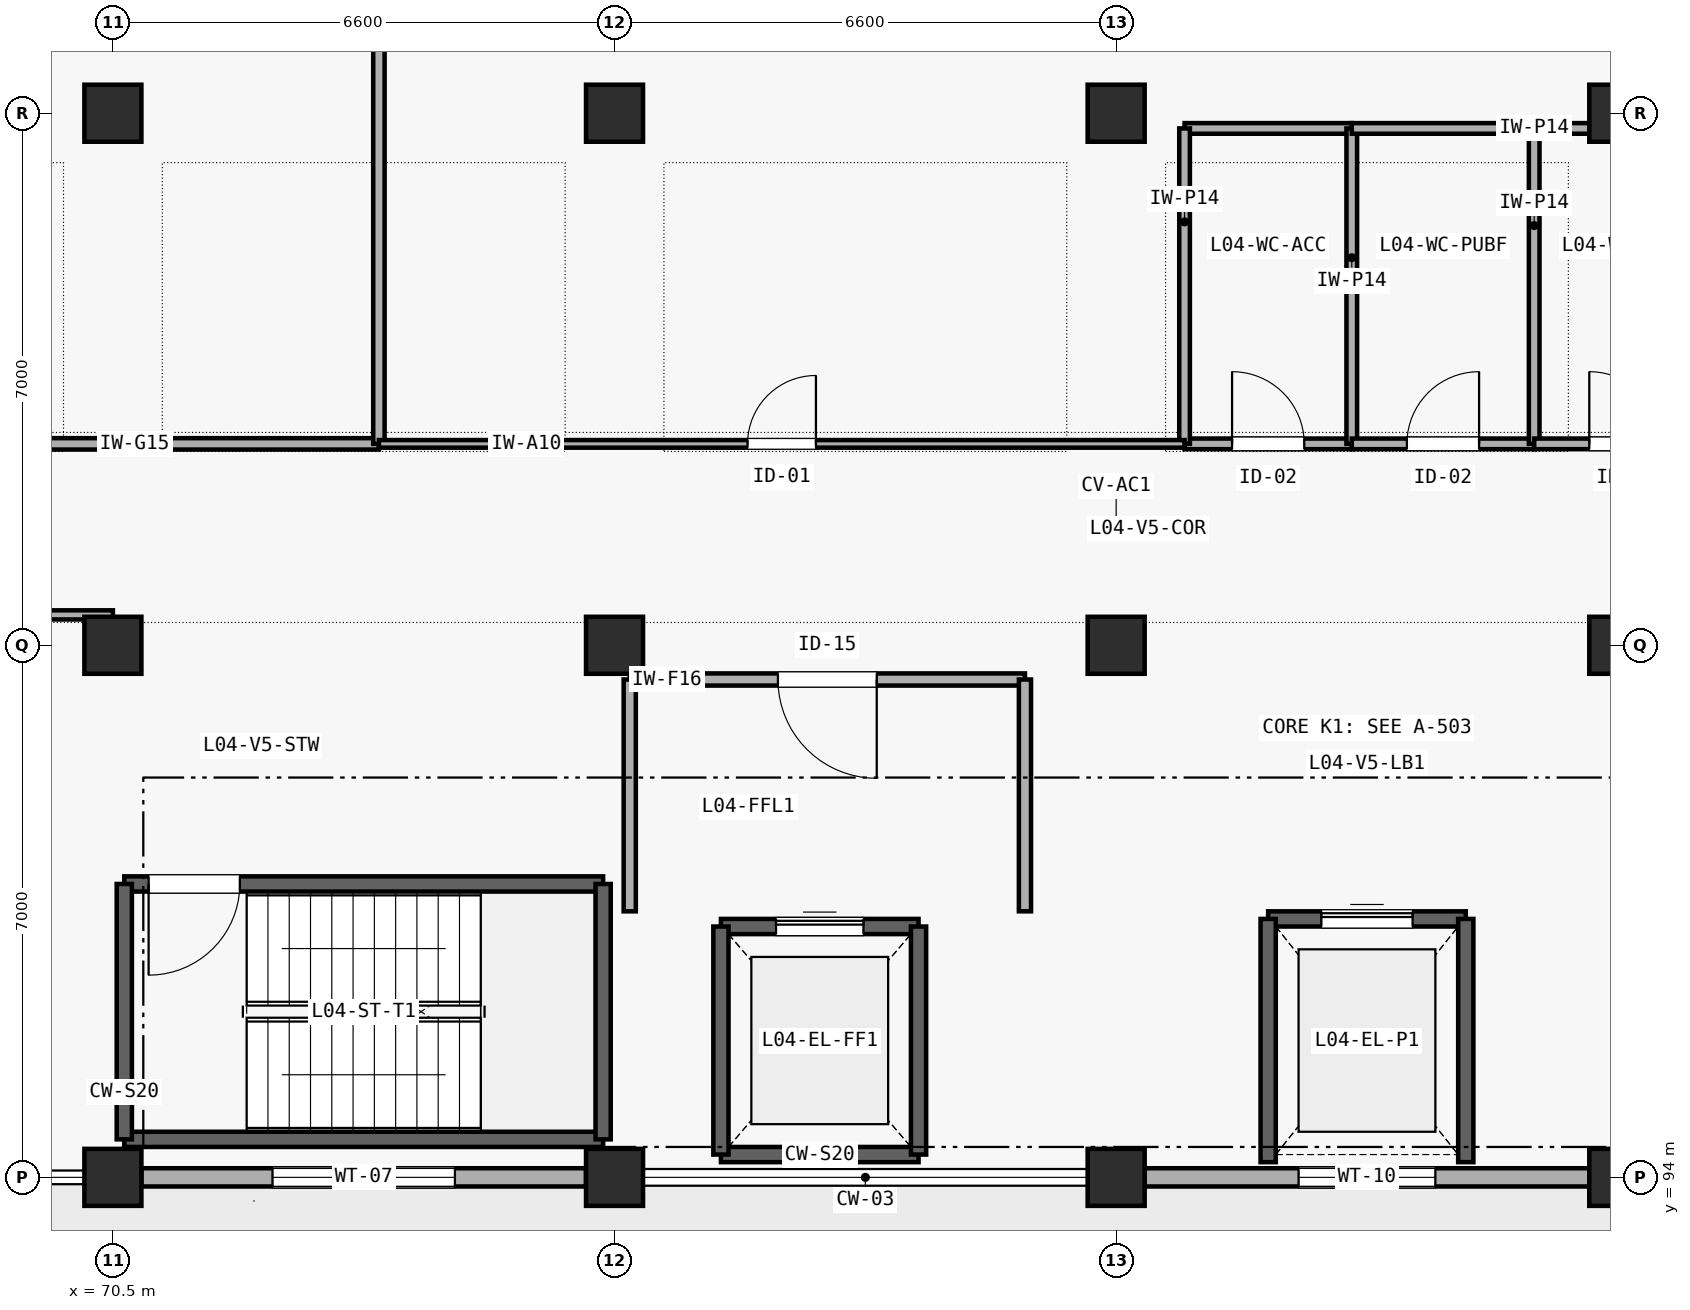
"""IFC4 building model, lengths in metres.
Left out: names, types, materials, properties, quantities, classifications, styles, units other than length and angle.
Written with IfcOpenShell. Run it as: python <this file> out.ifc"""

import sys

from ifc_helpers import new_model, si_unit, direction, frame, frame_2d, origin, origin_2d, place, context, subcontext, project, spatial, rectangle, extrude, element, fill, save


model = new_model("IFC4")
c1 = context("Model", 3, precision=1e-05, world=origin(), true_north=direction((0.0, 1.0)))
c2 = subcontext(c1, "Body", "Model", "MODEL_VIEW")
j1 = project(units=[si_unit("LENGTHUNIT", "METRE"), si_unit("PLANEANGLEUNIT", "RADIAN")], contexts=[c1])
p1 = place(None, origin())
s1 = spatial("IfcSite", under=j1, at=p1, CompositionType="ELEMENT")
p2 = place(p1, origin())
s2 = spatial("IfcBuilding", under=s1, at=p2, CompositionType="ELEMENT")
p3 = place(p2, frame((0.0, 0.0, 16.8)))
s3 = spatial("IfcBuildingStorey", under=s2, at=p3, CompositionType="ELEMENT", Elevation=16.8)
for number, where, z_axis, x_axis in (
    (1, (70.5, 94.0, 0.0), (0.0, 0.0, 1.0), (1.0, 0.0, 0.0)),
    (2, (70.5, 101.0, 0.0), (0.0, 0.0, 1.0), (1.0, 0.0, 0.0)),
    (3, (70.5, 108.0, 0.0), (0.0, 0.0, 1.0), (1.0, 0.0, 0.0)),
    (4, (77.1, 94.0, 0.0), (0.0, 0.0, 1.0), (1.0, 0.0, 0.0)),
    (5, (77.1, 101.0, 0.0), (0.0, 0.0, 1.0), (1.0, 0.0, 0.0)),
    (6, (77.1, 108.0, 0.0), (0.0, 0.0, 1.0), (1.0, 0.0, 0.0)),
    (7, (83.7, 94.0, 0.0), (0.0, 0.0, 1.0), (1.0, 0.0, 0.0)),
    (8, (83.7, 101.0, 0.0), (0.0, 0.0, 1.0), (1.0, 0.0, 0.0)),
    (9, (83.7, 108.0, 0.0), (0.0, 0.0, 1.0), (1.0, 0.0, 0.0)),
    (10, (90.3, 94.0, 0.0), (0.0, 0.0, 1.0), (1.0, 0.0, 0.0)),
    (11, (90.3, 101.0, 0.0), (0.0, 0.0, 1.0), (1.0, 0.0, 0.0)),
    (12, (90.3, 108.0, 0.0), (0.0, 0.0, 1.0), (1.0, 0.0, 0.0)),
):
    element("IfcColumn", number, at=place(p3, frame(where, z_axis=z_axis, x_axis=x_axis)), inside=s3, PredefinedType="COLUMN", context=c2, shape_type="SweptSolid", body=[
        extrude(rectangle(XDim=0.75, YDim=0.75, at=origin_2d()), origin(), (0.0, 0.0, 1.0), 4.2),
    ])
p4 = place(p3, frame((70.875, 94.0, 0.0), z_axis=(0.0, 0.0, 1.0), x_axis=(1.0, 0.0, 0.0)))
e13 = element("IfcWall", 13, at=p4, inside=s3, PredefinedType="SOLIDWALL", context=c2, shape_type="SweptSolid", body=[
    extrude(rectangle(XDim=5.85, YDim=0.24, at=frame_2d((2.925, 0.0))), origin(), (0.0, 0.0, 1.0), 3.365),
])
p5 = place(p4, frame((1.725, 0.0, 0.85)))
e14 = element("IfcOpeningElement", 14, at=p5, cuts=e13, PredefinedType="OPENING", context=c2, shape_type="SweptSolid", body=[
    extrude(rectangle(XDim=2.4, YDim=1.35, at=frame_2d((1.2, 0.675))), frame((0.0, 0.13, 0.0), z_axis=(0.0, -1.0, 0.0), x_axis=(1.0, 0.0, 0.0)), (0.0, 0.0, 1.0), 0.26),
])
p6 = place(p3, frame((84.075, 94.0, 0.0), z_axis=(0.0, 0.0, 1.0), x_axis=(1.0, 0.0, 0.0)))
e15 = element("IfcWall", 15, at=p6, inside=s3, PredefinedType="SOLIDWALL", context=c2, shape_type="SweptSolid", body=[
    extrude(rectangle(XDim=5.85, YDim=0.24, at=frame_2d((2.925, 0.0))), origin(), (0.0, 0.0, 1.0), 3.345),
])
p7 = place(p6, frame((2.025, 0.0, 0.85)))
e16 = element("IfcOpeningElement", 16, at=p7, cuts=e15, PredefinedType="OPENING", context=c2, shape_type="SweptSolid", body=[
    extrude(rectangle(XDim=1.8, YDim=1.5, at=frame_2d((0.9, 0.75))), frame((0.0, 0.13, 0.0), z_axis=(0.0, -1.0, 0.0), x_axis=(1.0, 0.0, 0.0)), (0.0, 0.0, 1.0), 0.26),
])
p8 = place(p3, frame((70.65, 94.5, 0.0), z_axis=(0.0, 0.0, 1.0), x_axis=(1.0, 0.0, 0.0)))
e17 = element("IfcWall", 17, at=p8, inside=s3, PredefinedType="SHEAR", context=c2, shape_type="SweptSolid", body=[
    extrude(rectangle(XDim=6.3, YDim=0.2, at=frame_2d((3.15, 0.0))), origin(), (0.0, 0.0, 1.0), 4.2),
])
p9 = place(p3, frame((70.65, 97.86, 0.0), z_axis=(0.0, 0.0, 1.0), x_axis=(1.0, 0.0, 0.0)))
e18 = element("IfcWall", 18, at=p9, inside=s3, PredefinedType="SHEAR", context=c2, shape_type="SweptSolid", body=[
    extrude(rectangle(XDim=6.3, YDim=0.2, at=frame_2d((3.15, 0.0))), origin(), (0.0, 0.0, 1.0), 4.2),
])
p10 = place(p9, frame((0.32, 0.0, 0.0)))
e19 = element("IfcOpeningElement", 19, at=p10, cuts=e18, PredefinedType="OPENING", context=c2, shape_type="SweptSolid", body=[
    extrude(rectangle(XDim=1.2, YDim=2.15, at=frame_2d((0.6, 1.075))), frame((0.0, 0.11, 0.0), z_axis=(0.0, -1.0, 0.0), x_axis=(1.0, 0.0, 0.0)), (0.0, 0.0, 1.0), 0.22),
])
for number, where, z_axis, x_axis in (
    (20, (70.65, 94.5, 0.0), (0.0, 0.0, 1.0), (0.0, 1.0, 0.0)),
    (21, (76.95, 94.5, 0.0), (0.0, 0.0, 1.0), (0.0, 1.0, 0.0)),
):
    element("IfcWall", number, at=place(p3, frame(where, z_axis=z_axis, x_axis=x_axis)), inside=s3, PredefinedType="SHEAR", context=c2, shape_type="SweptSolid", body=[
        extrude(rectangle(XDim=3.36, YDim=0.2, at=frame_2d((1.68, 0.0))), origin(), (0.0, 0.0, 1.0), 4.2),
    ])
p11 = place(p3, frame((78.5, 94.3, 0.0), z_axis=(0.0, 0.0, 1.0), x_axis=(1.0, 0.0, 0.0)))
e22 = element("IfcWall", 22, at=p11, inside=s3, PredefinedType="SHEAR", context=c2, shape_type="SweptSolid", body=[
    extrude(rectangle(XDim=2.6, YDim=0.2, at=frame_2d((1.3, 0.0))), origin(), (0.0, 0.0, 1.0), 4.2),
])
p12 = place(p3, frame((78.5, 97.3, 0.0), z_axis=(0.0, 0.0, 1.0), x_axis=(1.0, 0.0, 0.0)))
e23 = element("IfcWall", 23, at=p12, inside=s3, PredefinedType="SHEAR", context=c2, shape_type="SweptSolid", body=[
    extrude(rectangle(XDim=2.6, YDim=0.2, at=frame_2d((1.3, 0.0))), origin(), (0.0, 0.0, 1.0), 4.2),
])
p13 = place(p12, frame((0.725, 0.0, 0.0)))
e24 = element("IfcOpeningElement", 24, at=p13, cuts=e23, PredefinedType="OPENING", context=c2, shape_type="SweptSolid", body=[
    extrude(rectangle(XDim=1.15, YDim=2.2, at=frame_2d((0.575, 1.1))), frame((0.0, 0.11, 0.0), z_axis=(0.0, -1.0, 0.0), x_axis=(1.0, 0.0, 0.0)), (0.0, 0.0, 1.0), 0.22),
])
for number, where, z_axis, x_axis in (
    (25, (78.5, 94.3, 0.0), (0.0, 0.0, 1.0), (0.0, 1.0, 0.0)),
    (26, (81.1, 94.3, 0.0), (0.0, 0.0, 1.0), (0.0, 1.0, 0.0)),
):
    element("IfcWall", number, at=place(p3, frame(where, z_axis=z_axis, x_axis=x_axis)), inside=s3, PredefinedType="SHEAR", context=c2, shape_type="SweptSolid", body=[
        extrude(rectangle(XDim=3.0, YDim=0.2, at=frame_2d((1.5, 0.0))), origin(), (0.0, 0.0, 1.0), 4.2),
    ])
p14 = place(p3, frame((85.7, 97.4, 0.0), z_axis=(0.0, 0.0, 1.0), x_axis=(1.0, 0.0, 0.0)))
e27 = element("IfcWall", 27, at=p14, inside=s3, PredefinedType="SHEAR", context=c2, shape_type="SweptSolid", body=[
    extrude(rectangle(XDim=2.6, YDim=0.2, at=frame_2d((1.3, 0.0))), origin(), (0.0, 0.0, 1.0), 4.2),
])
p15 = place(p14, frame((0.7, 0.0, 0.0)))
e28 = element("IfcOpeningElement", 28, at=p15, cuts=e27, PredefinedType="OPENING", context=c2, shape_type="SweptSolid", body=[
    extrude(rectangle(XDim=1.2, YDim=2.2, at=frame_2d((0.6, 1.1))), frame((0.0, 0.11, 0.0), z_axis=(0.0, -1.0, 0.0), x_axis=(1.0, 0.0, 0.0)), (0.0, 0.0, 1.0), 0.22),
])
for number, where, z_axis, x_axis in (
    (29, (85.7, 94.2, 0.0), (0.0, 0.0, 1.0), (0.0, 1.0, 0.0)),
    (30, (88.3, 94.2, 0.0), (0.0, 0.0, 1.0), (0.0, 1.0, 0.0)),
):
    element("IfcWall", number, at=place(p3, frame(where, z_axis=z_axis, x_axis=x_axis)), inside=s3, PredefinedType="SHEAR", context=c2, shape_type="SweptSolid", body=[
        extrude(rectangle(XDim=3.2, YDim=0.2, at=frame_2d((1.6, 0.0))), origin(), (0.0, 0.0, 1.0), 4.2),
    ])
p16 = place(p3, frame((77.3, 100.55, 0.0), z_axis=(0.0, 0.0, 1.0), x_axis=(1.0, 0.0, 0.0)))
e31 = element("IfcWall", 31, at=p16, inside=s3, PredefinedType="SOLIDWALL", context=c2, shape_type="SweptSolid", body=[
    extrude(rectangle(XDim=5.2, YDim=0.16, at=frame_2d((2.6, 0.0))), origin(), (0.0, 0.0, 1.0), 3.9),
])
p17 = place(p16, frame((1.95, 0.0, 0.0)))
e32 = element("IfcOpeningElement", 32, at=p17, cuts=e31, PredefinedType="OPENING", context=c2, shape_type="SweptSolid", body=[
    extrude(rectangle(XDim=1.3, YDim=2.15, at=frame_2d((0.65, 1.075))), frame((0.0, 0.09, 0.0), z_axis=(0.0, -1.0, 0.0), x_axis=(1.0, 0.0, 0.0)), (0.0, 0.0, 1.0), 0.18),
])
p18 = place(p3, frame((77.3, 97.5, 0.0), z_axis=(0.0, 0.0, 1.0), x_axis=(0.0, 1.0, 0.0)))
e33 = element("IfcWall", 33, at=p18, inside=s3, PredefinedType="SOLIDWALL", context=c2, shape_type="SweptSolid", body=[
    extrude(rectangle(XDim=3.05, YDim=0.16, at=frame_2d((1.525, 0.0))), origin(), (0.0, 0.0, 1.0), 3.405),
])
p19 = place(p3, frame((82.5, 97.5, 0.0), z_axis=(0.0, 0.0, 1.0), x_axis=(0.0, 1.0, 0.0)))
e34 = element("IfcWall", 34, at=p19, inside=s3, PredefinedType="SOLIDWALL", context=c2, shape_type="SweptSolid", body=[
    extrude(rectangle(XDim=3.05, YDim=0.16, at=frame_2d((1.525, 0.0))), origin(), (0.0, 0.0, 1.0), 3.9),
])
p20 = place(p3, frame((84.6, 103.65, 0.0), z_axis=(0.0, 0.0, 1.0), x_axis=(1.0, 0.0, 0.0)))
e35 = element("IfcWall", 35, at=p20, inside=s3, PredefinedType="PLUMBINGWALL", context=c2, shape_type="SweptSolid", body=[
    extrude(rectangle(XDim=2.2, YDim=0.14, at=frame_2d((1.1, 0.0))), origin(), (0.0, 0.0, 1.0), 3.9),
])
p21 = place(p20, frame((0.625, 0.0, 0.0)))
e36 = element("IfcOpeningElement", 36, at=p21, cuts=e35, PredefinedType="OPENING", context=c2, shape_type="SweptSolid", body=[
    extrude(rectangle(XDim=0.95, YDim=2.1, at=frame_2d((0.475, 1.05))), frame((0.0, 0.08, 0.0), z_axis=(0.0, -1.0, 0.0), x_axis=(1.0, 0.0, 0.0)), (0.0, 0.0, 1.0), 0.16),
])
p22 = place(p3, frame((84.6, 107.8, 0.0), z_axis=(0.0, 0.0, 1.0), x_axis=(1.0, 0.0, 0.0)))
e37 = element("IfcWall", 37, at=p22, inside=s3, PredefinedType="PLUMBINGWALL", context=c2, shape_type="SweptSolid", body=[
    extrude(rectangle(XDim=2.2, YDim=0.14, at=frame_2d((1.1, 0.0))), origin(), (0.0, 0.0, 1.0), 3.345),
])
for number, where, z_axis, x_axis in (
    (38, (84.6, 103.65, 0.0), (0.0, 0.0, 1.0), (0.0, 1.0, 0.0)),
    (39, (86.8, 103.65, 0.0), (0.0, 0.0, 1.0), (0.0, 1.0, 0.0)),
):
    element("IfcWall", number, at=place(p3, frame(where, z_axis=z_axis, x_axis=x_axis)), inside=s3, PredefinedType="PLUMBINGWALL", context=c2, shape_type="SweptSolid", body=[
        extrude(rectangle(XDim=4.15, YDim=0.14, at=frame_2d((2.075, 0.0))), origin(), (0.0, 0.0, 1.0), 3.9),
    ])
p23 = place(p3, frame((86.8, 103.65, 0.0), z_axis=(0.0, 0.0, 1.0), x_axis=(1.0, 0.0, 0.0)))
e40 = element("IfcWall", 40, at=p23, inside=s3, PredefinedType="PLUMBINGWALL", context=c2, shape_type="SweptSolid", body=[
    extrude(rectangle(XDim=2.4, YDim=0.14, at=frame_2d((1.2, 0.0))), origin(), (0.0, 0.0, 1.0), 3.9),
])
p24 = place(p23, frame((0.725, 0.0, 0.0)))
e41 = element("IfcOpeningElement", 41, at=p24, cuts=e40, PredefinedType="OPENING", context=c2, shape_type="SweptSolid", body=[
    extrude(rectangle(XDim=0.95, YDim=2.1, at=frame_2d((0.475, 1.05))), frame((0.0, 0.08, 0.0), z_axis=(0.0, -1.0, 0.0), x_axis=(1.0, 0.0, 0.0)), (0.0, 0.0, 1.0), 0.16),
])
p25 = place(p3, frame((86.8, 107.8, 0.0), z_axis=(0.0, 0.0, 1.0), x_axis=(1.0, 0.0, 0.0)))
e42 = element("IfcWall", 42, at=p25, inside=s3, PredefinedType="PLUMBINGWALL", context=c2, shape_type="SweptSolid", body=[
    extrude(rectangle(XDim=2.4, YDim=0.14, at=frame_2d((1.2, 0.0))), origin(), (0.0, 0.0, 1.0), 3.345),
])
p26 = place(p3, frame((89.2, 103.65, 0.0), z_axis=(0.0, 0.0, 1.0), x_axis=(0.0, 1.0, 0.0)))
e43 = element("IfcWall", 43, at=p26, inside=s3, PredefinedType="PLUMBINGWALL", context=c2, shape_type="SweptSolid", body=[
    extrude(rectangle(XDim=4.15, YDim=0.14, at=frame_2d((2.075, 0.0))), origin(), (0.0, 0.0, 1.0), 3.9),
])
p27 = place(p3, frame((89.2, 103.65, 0.0), z_axis=(0.0, 0.0, 1.0), x_axis=(1.0, 0.0, 0.0)))
e44 = element("IfcWall", 44, at=p27, inside=s3, PredefinedType="PLUMBINGWALL", context=c2, shape_type="SweptSolid", body=[
    extrude(rectangle(XDim=2.4, YDim=0.14, at=frame_2d((1.2, 0.0))), origin(), (0.0, 0.0, 1.0), 3.9),
])
p28 = place(p27, frame((0.725, 0.0, 0.0)))
e45 = element("IfcOpeningElement", 45, at=p28, cuts=e44, PredefinedType="OPENING", context=c2, shape_type="SweptSolid", body=[
    extrude(rectangle(XDim=0.95, YDim=2.1, at=frame_2d((0.475, 1.05))), frame((0.0, 0.08, 0.0), z_axis=(0.0, -1.0, 0.0), x_axis=(1.0, 0.0, 0.0)), (0.0, 0.0, 1.0), 0.16),
])
p29 = place(p3, frame((89.2, 107.8, 0.0), z_axis=(0.0, 0.0, 1.0), x_axis=(1.0, 0.0, 0.0)))
e46 = element("IfcWall", 46, at=p29, inside=s3, PredefinedType="PLUMBINGWALL", context=c2, shape_type="SweptSolid", body=[
    extrude(rectangle(XDim=2.4, YDim=0.14, at=frame_2d((1.2, 0.0))), origin(), (0.0, 0.0, 1.0), 3.345),
])
p30 = place(p3, frame((57.5, 103.65, 0.0), z_axis=(0.0, 0.0, 1.0), x_axis=(1.0, 0.0, 0.0)))
e47 = element("IfcWall", 47, at=p30, inside=s3, PredefinedType="PARTITIONING", context=c2, shape_type="SweptSolid", body=[
    extrude(rectangle(XDim=16.5, YDim=0.15, at=frame_2d((8.25, 0.0))), origin(), (0.0, 0.0, 1.0), 3.9),
])
p31 = place(p30, frame((7.4, 0.0, 0.0)))
e48 = element("IfcOpeningElement", 48, at=p31, cuts=e47, PredefinedType="OPENING", context=c2, shape_type="SweptSolid", body=[
    extrude(rectangle(XDim=1.7, YDim=2.2, at=frame_2d((0.85, 1.1))), frame((0.0, 0.085, 0.0), z_axis=(0.0, -1.0, 0.0), x_axis=(1.0, 0.0, 0.0)), (0.0, 0.0, 1.0), 0.17),
])
p32 = place(p3, frame((74.0, 103.65, 0.0), z_axis=(0.0, 0.0, 1.0), x_axis=(0.0, 1.0, 0.0)))
e49 = element("IfcWall", 49, at=p32, inside=s3, PredefinedType="PARTITIONING", context=c2, shape_type="SweptSolid", body=[
    extrude(rectangle(XDim=11.15, YDim=0.15, at=frame_2d((5.575, 0.0))), origin(), (0.0, 0.0, 1.0), 3.9),
])
p33 = place(p3, frame((74.0, 103.65, 0.0), z_axis=(0.0, 0.0, 1.0), x_axis=(1.0, 0.0, 0.0)))
e50 = element("IfcWall", 50, at=p33, inside=s3, PredefinedType="PARTITIONING", context=c2, shape_type="SweptSolid", body=[
    extrude(rectangle(XDim=10.6, YDim=0.1, at=frame_2d((5.3, 0.0))), origin(), (0.0, 0.0, 1.0), 3.9),
])
p34 = place(p33, frame((4.85, 0.0, 0.0)))
e51 = element("IfcOpeningElement", 51, at=p34, cuts=e50, PredefinedType="OPENING", context=c2, shape_type="SweptSolid", body=[
    extrude(rectangle(XDim=0.9, YDim=2.1, at=frame_2d((0.45, 1.05))), frame((0.0, 0.06, 0.0), z_axis=(0.0, -1.0, 0.0), x_axis=(1.0, 0.0, 0.0)), (0.0, 0.0, 1.0), 0.12),
])
p35 = place(p3, frame((57.5, 101.4, 0.0), z_axis=(0.0, 0.0, 1.0), x_axis=(1.0, 0.0, 0.0)))
e52 = element("IfcWall", 52, at=p35, inside=s3, PredefinedType="PARTITIONING", context=c2, shape_type="SweptSolid", body=[
    extrude(rectangle(XDim=13.0, YDim=0.12, at=frame_2d((6.5, 0.0))), origin(), (0.0, 0.0, 1.0), 3.9),
])
p36 = place(p35, frame((8.175, 0.0, 0.0)))
e53 = element("IfcOpeningElement", 53, at=p36, cuts=e52, PredefinedType="OPENING", context=c2, shape_type="SweptSolid", body=[
    extrude(rectangle(XDim=1.05, YDim=2.15, at=frame_2d((0.525, 1.075))), frame((0.0, 0.07, 0.0), z_axis=(0.0, -1.0, 0.0), x_axis=(1.0, 0.0, 0.0)), (0.0, 0.0, 1.0), 0.14),
])
p37 = place(p5, origin())
e54 = element("IfcWindow", 54, at=p37, inside=s3, PartitioningType="SINGLE_PANEL", PredefinedType="WINDOW", context=c2, shape_type="SweptSolid", body=[
    extrude(rectangle(XDim=2.4, YDim=1.35, at=frame_2d((1.2, 0.675))), frame((0.0, 0.03, 0.0), z_axis=(0.0, -1.0, 0.0), x_axis=(1.0, 0.0, 0.0)), (0.0, 0.0, 1.0), 0.06),
])
fill(e14, e54)
p38 = place(p7, origin())
e55 = element("IfcWindow", 55, at=p38, inside=s3, PartitioningType="SINGLE_PANEL", PredefinedType="WINDOW", context=c2, shape_type="SweptSolid", body=[
    extrude(rectangle(XDim=1.8, YDim=1.5, at=frame_2d((0.9, 0.75))), frame((0.0, 0.03, 0.0), z_axis=(0.0, -1.0, 0.0), x_axis=(1.0, 0.0, 0.0)), (0.0, 0.0, 1.0), 0.06),
])
fill(e16, e55)
p39 = place(p10, frame((1.2, 0.0, 0.0), z_axis=(0.0, 0.0, 1.0), x_axis=(-1.0, 0.0, 0.0)))
e56 = element("IfcDoor", 56, at=p39, inside=s3, OperationType="SINGLE_SWING_RIGHT", PredefinedType="DOOR", context=c2, shape_type="SweptSolid", body=[
    extrude(rectangle(XDim=1.2, YDim=2.15, at=frame_2d((0.6, 1.075))), frame((0.0, 0.025, 0.0), z_axis=(0.0, -1.0, 0.0), x_axis=(1.0, 0.0, 0.0)), (0.0, 0.0, 1.0), 0.05),
])
fill(e19, e56)
p40 = place(p13, origin())
e57 = element("IfcDoor", 57, at=p40, inside=s3, OperationType="SLIDING_TO_LEFT", PredefinedType="DOOR", context=c2, shape_type="SweptSolid", body=[
    extrude(rectangle(XDim=1.15, YDim=2.2, at=frame_2d((0.575, 1.1))), frame((0.0, 0.025, 0.0), z_axis=(0.0, -1.0, 0.0), x_axis=(1.0, 0.0, 0.0)), (0.0, 0.0, 1.0), 0.05),
])
fill(e24, e57)
p41 = place(p15, origin())
e58 = element("IfcDoor", 58, at=p41, inside=s3, OperationType="SLIDING_TO_LEFT", PredefinedType="DOOR", context=c2, shape_type="SweptSolid", body=[
    extrude(rectangle(XDim=1.2, YDim=2.2, at=frame_2d((0.6, 1.1))), frame((0.0, 0.025, 0.0), z_axis=(0.0, -1.0, 0.0), x_axis=(1.0, 0.0, 0.0)), (0.0, 0.0, 1.0), 0.05),
])
fill(e28, e58)
p42 = place(p17, frame((1.3, 0.0, 0.0), z_axis=(0.0, 0.0, 1.0), x_axis=(-1.0, 0.0, 0.0)))
e59 = element("IfcDoor", 59, at=p42, inside=s3, OperationType="SINGLE_SWING_LEFT", PredefinedType="DOOR", context=c2, shape_type="SweptSolid", body=[
    extrude(rectangle(XDim=1.3, YDim=2.15, at=frame_2d((0.65, 1.075))), frame((0.0, 0.025, 0.0), z_axis=(0.0, -1.0, 0.0), x_axis=(1.0, 0.0, 0.0)), (0.0, 0.0, 1.0), 0.05),
])
fill(e32, e59)
p43 = place(p21, origin())
e60 = element("IfcDoor", 60, at=p43, inside=s3, OperationType="SINGLE_SWING_LEFT", PredefinedType="DOOR", context=c2, shape_type="SweptSolid", body=[
    extrude(rectangle(XDim=0.95, YDim=2.1, at=frame_2d((0.475, 1.05))), frame((0.0, 0.025, 0.0), z_axis=(0.0, -1.0, 0.0), x_axis=(1.0, 0.0, 0.0)), (0.0, 0.0, 1.0), 0.05),
])
fill(e36, e60)
p44 = place(p24, origin())
e61 = element("IfcDoor", 61, at=p44, inside=s3, OperationType="SINGLE_SWING_RIGHT", PredefinedType="DOOR", context=c2, shape_type="SweptSolid", body=[
    extrude(rectangle(XDim=0.95, YDim=2.1, at=frame_2d((0.475, 1.05))), frame((0.0, 0.025, 0.0), z_axis=(0.0, -1.0, 0.0), x_axis=(1.0, 0.0, 0.0)), (0.0, 0.0, 1.0), 0.05),
])
fill(e41, e61)
p45 = place(p28, origin())
e62 = element("IfcDoor", 62, at=p45, inside=s3, OperationType="SINGLE_SWING_LEFT", PredefinedType="DOOR", context=c2, shape_type="SweptSolid", body=[
    extrude(rectangle(XDim=0.95, YDim=2.1, at=frame_2d((0.475, 1.05))), frame((0.0, 0.025, 0.0), z_axis=(0.0, -1.0, 0.0), x_axis=(1.0, 0.0, 0.0)), (0.0, 0.0, 1.0), 0.05),
])
fill(e45, e62)
p46 = place(p34, origin())
e63 = element("IfcDoor", 63, at=p46, inside=s3, OperationType="SINGLE_SWING_RIGHT", PredefinedType="DOOR", context=c2, shape_type="SweptSolid", body=[
    extrude(rectangle(XDim=0.9, YDim=2.1, at=frame_2d((0.45, 1.05))), frame((0.0, 0.025, 0.0), z_axis=(0.0, -1.0, 0.0), x_axis=(1.0, 0.0, 0.0)), (0.0, 0.0, 1.0), 0.05),
])
fill(e51, e63)
save(model, sys.argv[1])
